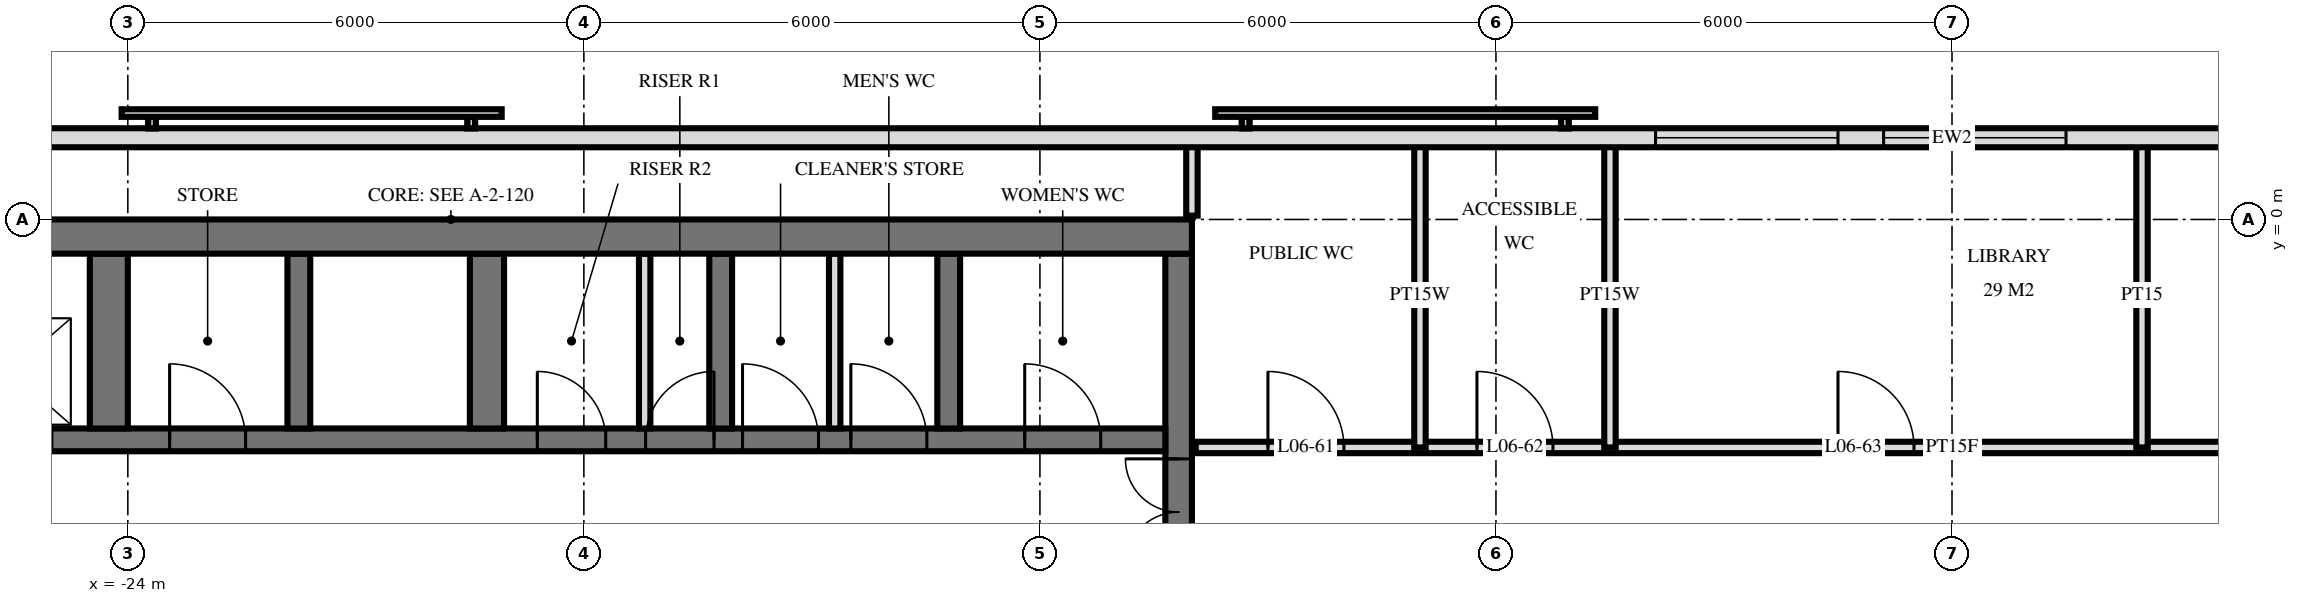
"""IFC4 building model, lengths in metres.
Left out: names, types, materials, properties, quantities, classifications, styles, units other than length and angle.
Written with IfcOpenShell. Run it as: python <this file> out.ifc"""

import sys

from ifc_helpers import new_model, si_unit, direction, frame, frame_2d, origin, place, context, subcontext, project, spatial, rectangle, extrude, element, fill, save


model = new_model("IFC4")
c1 = context("Model", 3, precision=1e-05, world=origin(), true_north=direction((0.0, 1.0)))
c2 = subcontext(c1, "Body", "Model", "MODEL_VIEW")
j1 = project(units=[si_unit("LENGTHUNIT", "METRE"), si_unit("PLANEANGLEUNIT", "RADIAN")], contexts=[c1])
p1 = place(None, origin())
s1 = spatial("IfcSite", under=j1, at=p1, CompositionType="ELEMENT")
p2 = place(p1, origin())
s2 = spatial("IfcBuilding", under=s1, at=p2, CompositionType="ELEMENT")
p3 = place(p2, frame((0.0, 0.0, 31.2)))
s3 = spatial("IfcBuildingStorey", under=s2, at=p3, CompositionType="ELEMENT", Elevation=31.2)
p4 = place(p3, frame((-29.5, -0.225, 0.0), z_axis=(0.0, 0.0, 1.0), x_axis=(1.0, 0.0, 0.0)))
e1 = element("IfcWall", 1, at=p4, inside=s3, PredefinedType="SHEAR", context=c2, shape_type="SweptSolid", body=[
    extrude(rectangle(XDim=19.5, YDim=0.45, at=frame_2d((9.75, 0.0))), origin(), (0.0, 0.0, 1.0), 3.6),
])
p5 = place(p3, frame((-10.175, -14.55, 0.0), z_axis=(0.0, 0.0, 1.0), x_axis=(0.0, 1.0, 0.0)))
e2 = element("IfcWall", 2, at=p5, inside=s3, PredefinedType="SHEAR", context=c2, shape_type="SweptSolid", body=[
    extrude(rectangle(XDim=14.1, YDim=0.35, at=frame_2d((7.05, 0.0))), origin(), (0.0, 0.0, 1.0), 3.6),
])
p6 = place(p5, frame((8.4, 0.0, 0.0)))
e3 = element("IfcOpeningElement", 3, at=p6, cuts=e2, PredefinedType="OPENING", context=c2, shape_type="SweptSolid", body=[
    extrude(rectangle(XDim=1.4, YDim=2.4, at=frame_2d((0.7, 1.2))), frame((0.0, 0.185, 0.0), z_axis=(0.0, -1.0, 0.0), x_axis=(1.0, 0.0, 0.0)), (0.0, 0.0, 1.0), 0.37),
])
p7 = place(p5, frame((10.0, 0.0, 0.0)))
e4 = element("IfcOpeningElement", 4, at=p7, cuts=e2, PredefinedType="OPENING", context=c2, shape_type="SweptSolid", body=[
    extrude(rectangle(XDim=1.4, YDim=2.4, at=frame_2d((0.7, 1.2))), frame((0.0, 0.185, 0.0), z_axis=(0.0, -1.0, 0.0), x_axis=(1.0, 0.0, 0.0)), (0.0, 0.0, 1.0), 0.37),
])
p8 = place(p5, frame((4.0, 0.0, 0.0)))
e5 = element("IfcOpeningElement", 5, at=p8, cuts=e2, PredefinedType="OPENING", context=c2, shape_type="SweptSolid", body=[
    extrude(rectangle(XDim=1.2, YDim=2.1, at=frame_2d((0.6, 1.05))), frame((0.0, 0.185, 0.0), z_axis=(0.0, -1.0, 0.0), x_axis=(1.0, 0.0, 0.0)), (0.0, 0.0, 1.0), 0.37),
])
p9 = place(p3, frame((-29.05, -2.9, 0.0), z_axis=(0.0, 0.0, 1.0), x_axis=(1.0, 0.0, 0.0)))
e6 = element("IfcWall", 6, at=p9, inside=s3, PredefinedType="SHEAR", context=c2, shape_type="SweptSolid", body=[
    extrude(rectangle(XDim=18.7, YDim=0.3, at=frame_2d((9.35, 0.0))), origin(), (0.0, 0.0, 1.0), 3.6),
])
p10 = place(p9, frame((2.95, 0.0, 0.0)))
e7 = element("IfcOpeningElement", 7, at=p10, cuts=e6, PredefinedType="OPENING", context=c2, shape_type="SweptSolid", body=[
    extrude(rectangle(XDim=1.1, YDim=2.1, at=frame_2d((0.55, 1.05))), frame((0.0, 0.16, 0.0), z_axis=(0.0, -1.0, 0.0), x_axis=(1.0, 0.0, 0.0)), (0.0, 0.0, 1.0), 0.32),
])
p11 = place(p9, frame((0.55, 0.0, 0.0)))
e8 = element("IfcOpeningElement", 8, at=p11, cuts=e6, PredefinedType="OPENING", context=c2, shape_type="SweptSolid", body=[
    extrude(rectangle(XDim=1.1, YDim=2.1, at=frame_2d((0.55, 1.05))), frame((0.0, 0.16, 0.0), z_axis=(0.0, -1.0, 0.0), x_axis=(1.0, 0.0, 0.0)), (0.0, 0.0, 1.0), 0.32),
])
p12 = place(p9, frame((11.863, 0.0, 0.0)))
e9 = element("IfcOpeningElement", 9, at=p12, cuts=e6, PredefinedType="OPENING", context=c2, shape_type="SweptSolid", body=[
    extrude(rectangle(XDim=0.9, YDim=2.1, at=frame_2d((0.45, 1.05))), frame((0.0, 0.16, 0.0), z_axis=(0.0, -1.0, 0.0), x_axis=(1.0, 0.0, 0.0)), (0.0, 0.0, 1.0), 0.32),
])
p13 = place(p9, frame((10.438, 0.0, 0.0)))
e10 = element("IfcOpeningElement", 10, at=p13, cuts=e6, PredefinedType="OPENING", context=c2, shape_type="SweptSolid", body=[
    extrude(rectangle(XDim=0.9, YDim=2.1, at=frame_2d((0.45, 1.05))), frame((0.0, 0.16, 0.0), z_axis=(0.0, -1.0, 0.0), x_axis=(1.0, 0.0, 0.0)), (0.0, 0.0, 1.0), 0.32),
])
p14 = place(p9, frame((16.85, 0.0, 0.0)))
e11 = element("IfcOpeningElement", 11, at=p14, cuts=e6, PredefinedType="OPENING", context=c2, shape_type="SweptSolid", body=[
    extrude(rectangle(XDim=1.0, YDim=2.1, at=frame_2d((0.5, 1.05))), frame((0.0, 0.16, 0.0), z_axis=(0.0, -1.0, 0.0), x_axis=(1.0, 0.0, 0.0)), (0.0, 0.0, 1.0), 0.32),
])
p15 = place(p9, frame((14.562, 0.0, 0.0)))
e12 = element("IfcOpeningElement", 12, at=p15, cuts=e6, PredefinedType="OPENING", context=c2, shape_type="SweptSolid", body=[
    extrude(rectangle(XDim=1.0, YDim=2.1, at=frame_2d((0.5, 1.05))), frame((0.0, 0.16, 0.0), z_axis=(0.0, -1.0, 0.0), x_axis=(1.0, 0.0, 0.0)), (0.0, 0.0, 1.0), 0.32),
])
p16 = place(p9, frame((13.137, 0.0, 0.0)))
e13 = element("IfcOpeningElement", 13, at=p16, cuts=e6, PredefinedType="OPENING", context=c2, shape_type="SweptSolid", body=[
    extrude(rectangle(XDim=1.0, YDim=2.1, at=frame_2d((0.5, 1.05))), frame((0.0, 0.16, 0.0), z_axis=(0.0, -1.0, 0.0), x_axis=(1.0, 0.0, 0.0)), (0.0, 0.0, 1.0), 0.32),
])
p17 = place(p9, frame((5.6, 0.0, 0.0)))
e14 = element("IfcOpeningElement", 14, at=p17, cuts=e6, PredefinedType="OPENING", context=c2, shape_type="SweptSolid", body=[
    extrude(rectangle(XDim=1.0, YDim=2.1, at=frame_2d((0.5, 1.05))), frame((0.0, 0.16, 0.0), z_axis=(0.0, -1.0, 0.0), x_axis=(1.0, 0.0, 0.0)), (0.0, 0.0, 1.0), 0.32),
])
for number, where, z_axis, x_axis in (
    (15, (-13.2, -2.75, 0.0), (0.0, 0.0, 1.0), (0.0, 1.0, 0.0)),
    (16, (-16.2, -2.75, 0.0), (0.0, 0.0, 1.0), (0.0, 1.0, 0.0)),
):
    element("IfcWall", number, at=place(p3, frame(where, z_axis=z_axis, x_axis=x_axis)), inside=s3, PredefinedType="SHEAR", context=c2, shape_type="SweptSolid", body=[
        extrude(rectangle(XDim=2.3, YDim=0.3, at=frame_2d((1.15, 0.0))), origin(), (0.0, 0.0, 1.0), 3.6),
    ])
p18 = place(p3, frame((-19.275, -2.75, 0.0), z_axis=(0.0, 0.0, 1.0), x_axis=(0.0, 1.0, 0.0)))
e17 = element("IfcWall", 17, at=p18, inside=s3, PredefinedType="SHEAR", context=c2, shape_type="SweptSolid", body=[
    extrude(rectangle(XDim=2.3, YDim=0.45, at=frame_2d((1.15, 0.0))), origin(), (0.0, 0.0, 1.0), 3.6),
])
p19 = place(p3, frame((-21.75, -2.75, 0.0), z_axis=(0.0, 0.0, 1.0), x_axis=(0.0, 1.0, 0.0)))
e18 = element("IfcWall", 18, at=p19, inside=s3, PredefinedType="SHEAR", context=c2, shape_type="SweptSolid", body=[
    extrude(rectangle(XDim=2.3, YDim=0.3, at=frame_2d((1.15, 0.0))), origin(), (0.0, 0.0, 1.0), 3.6),
])
p20 = place(p3, frame((-24.25, -2.75, 0.0), z_axis=(0.0, 0.0, 1.0), x_axis=(0.0, 1.0, 0.0)))
e19 = element("IfcWall", 19, at=p20, inside=s3, PredefinedType="SHEAR", context=c2, shape_type="SweptSolid", body=[
    extrude(rectangle(XDim=2.3, YDim=0.5, at=frame_2d((1.15, 0.0))), origin(), (0.0, 0.0, 1.0), 3.6),
])
p21 = place(p3, frame((28.775, 1.075, 0.0), z_axis=(0.0, 0.0, 1.0), x_axis=(-1.0, 0.0, 0.0)))
e20 = element("IfcWall", 20, at=p21, inside=s3, PredefinedType="SOLIDWALL", context=c2, shape_type="SweptSolid", body=[
    extrude(rectangle(XDim=57.551, YDim=0.25, at=frame_2d((28.775, 0.0))), origin(), (0.0, 0.0, 1.0), 3.32),
])
p22 = place(p21, frame((21.275, 0.0, 0.3)))
e21 = element("IfcOpeningElement", 21, at=p22, cuts=e20, PredefinedType="OPENING", context=c2, shape_type="SweptSolid", body=[
    extrude(rectangle(XDim=2.4, YDim=2.1, at=frame_2d((1.2, 1.05))), frame((0.0, 0.135, 0.0), z_axis=(0.0, -1.0, 0.0), x_axis=(1.0, 0.0, 0.0)), (0.0, 0.0, 1.0), 0.27),
])
p23 = place(p21, frame((27.275, 0.0, 0.3)))
e22 = element("IfcOpeningElement", 22, at=p23, cuts=e20, PredefinedType="OPENING", context=c2, shape_type="SweptSolid", body=[
    extrude(rectangle(XDim=2.4, YDim=2.1, at=frame_2d((1.2, 1.05))), frame((0.0, 0.135, 0.0), z_axis=(0.0, -1.0, 0.0), x_axis=(1.0, 0.0, 0.0)), (0.0, 0.0, 1.0), 0.27),
])
p24 = place(p21, frame((30.275, 0.0, 0.3)))
e23 = element("IfcOpeningElement", 23, at=p24, cuts=e20, PredefinedType="OPENING", context=c2, shape_type="SweptSolid", body=[
    extrude(rectangle(XDim=2.4, YDim=2.1, at=frame_2d((1.2, 1.05))), frame((0.0, 0.135, 0.0), z_axis=(0.0, -1.0, 0.0), x_axis=(1.0, 0.0, 0.0)), (0.0, 0.0, 1.0), 0.27),
])
for number, where, z_axis, x_axis in (
    (24, (-17.2, -2.75, 0.0), (0.0, 0.0, 1.0), (0.0, 1.0, 0.0)),
    (25, (-14.7, -2.75, 0.0), (0.0, 0.0, 1.0), (0.0, 1.0, 0.0)),
):
    element("IfcWall", number, at=place(p3, frame(where, z_axis=z_axis, x_axis=x_axis)), inside=s3, PredefinedType="PARTITIONING", context=c2, shape_type="SweptSolid", body=[
        extrude(rectangle(XDim=2.3, YDim=0.15, at=frame_2d((1.15, 0.0))), origin(), (0.0, 0.0, 1.0), 3.3),
    ])
p25 = place(p3, frame((2.5, -3.0, 0.0), z_axis=(0.0, 0.0, 1.0), x_axis=(0.0, 1.0, 0.0)))
e26 = element("IfcWall", 26, at=p25, inside=s3, PredefinedType="PARTITIONING", context=c2, shape_type="SweptSolid", body=[
    extrude(rectangle(XDim=4.02, YDim=0.15, at=frame_2d((2.01, 0.0))), origin(), (0.0, 0.0, 1.0), 3.32),
])
for number, where, z_axis, x_axis in (
    (27, (-4.5, -3.0, 0.0), (0.0, 0.0, 1.0), (0.0, 1.0, 0.0)),
    (28, (-7.0, -3.0, 0.0), (0.0, 0.0, 1.0), (0.0, 1.0, 0.0)),
):
    element("IfcWall", number, at=place(p3, frame(where, z_axis=z_axis, x_axis=x_axis)), inside=s3, PredefinedType="PLUMBINGWALL", context=c2, shape_type="SweptSolid", body=[
        extrude(rectangle(XDim=4.02, YDim=0.15, at=frame_2d((2.01, 0.0))), origin(), (0.0, 0.0, 1.0), 3.32),
    ])
p26 = place(p3, frame((-10.0, 0.05, 0.0), z_axis=(0.0, 0.0, 1.0), x_axis=(0.0, 1.0, 0.0)))
e29 = element("IfcWall", 29, at=p26, inside=s3, PredefinedType="PLUMBINGWALL", context=c2, shape_type="SweptSolid", body=[
    extrude(rectangle(XDim=0.97, YDim=0.15, at=frame_2d((0.485, 0.0))), origin(), (0.0, 0.0, 1.0), 3.32),
])
p27 = place(p3, frame((-9.95, -3.0, 0.0), z_axis=(0.0, 0.0, 1.0), x_axis=(1.0, 0.0, 0.0)))
e30 = element("IfcWall", 30, at=p27, inside=s3, PredefinedType="PARTITIONING", context=c2, shape_type="SweptSolid", body=[
    extrude(rectangle(XDim=19.9, YDim=0.15, at=frame_2d((9.95, 0.0))), origin(), (0.0, 0.0, 1.0), 3.32),
])
p28 = place(p27, frame((0.95, 0.0, 0.0)))
e31 = element("IfcOpeningElement", 31, at=p28, cuts=e30, PredefinedType="OPENING", context=c2, shape_type="SweptSolid", body=[
    extrude(rectangle(XDim=1.0, YDim=2.1, at=frame_2d((0.5, 1.05))), frame((0.0, 0.085, 0.0), z_axis=(0.0, -1.0, 0.0), x_axis=(1.0, 0.0, 0.0)), (0.0, 0.0, 1.0), 0.17),
])
p29 = place(p27, frame((3.7, 0.0, 0.0)))
e32 = element("IfcOpeningElement", 32, at=p29, cuts=e30, PredefinedType="OPENING", context=c2, shape_type="SweptSolid", body=[
    extrude(rectangle(XDim=1.0, YDim=2.1, at=frame_2d((0.5, 1.05))), frame((0.0, 0.085, 0.0), z_axis=(0.0, -1.0, 0.0), x_axis=(1.0, 0.0, 0.0)), (0.0, 0.0, 1.0), 0.17),
])
p30 = place(p27, frame((8.45, 0.0, 0.0)))
e33 = element("IfcOpeningElement", 33, at=p30, cuts=e30, PredefinedType="OPENING", context=c2, shape_type="SweptSolid", body=[
    extrude(rectangle(XDim=1.0, YDim=2.1, at=frame_2d((0.5, 1.05))), frame((0.0, 0.085, 0.0), z_axis=(0.0, -1.0, 0.0), x_axis=(1.0, 0.0, 0.0)), (0.0, 0.0, 1.0), 0.17),
])
p31 = place(p27, frame((15.7, 0.0, 0.0)))
e34 = element("IfcOpeningElement", 34, at=p31, cuts=e30, PredefinedType="OPENING", context=c2, shape_type="SweptSolid", body=[
    extrude(rectangle(XDim=1.0, YDim=2.1, at=frame_2d((0.5, 1.05))), frame((0.0, 0.085, 0.0), z_axis=(0.0, -1.0, 0.0), x_axis=(1.0, 0.0, 0.0)), (0.0, 0.0, 1.0), 0.17),
])
p32 = place(p23, origin())
e35 = element("IfcWindow", 35, at=p32, inside=s3, PartitioningType="SINGLE_PANEL", PredefinedType="WINDOW", context=c2, shape_type="SweptSolid", body=[
    extrude(rectangle(XDim=2.4, YDim=2.1, at=frame_2d((1.2, 1.05))), frame((0.0, 0.03, 0.0), z_axis=(0.0, -1.0, 0.0), x_axis=(1.0, 0.0, 0.0)), (0.0, 0.0, 1.0), 0.06),
])
fill(e22, e35)
p33 = place(p24, origin())
e36 = element("IfcWindow", 36, at=p33, inside=s3, PartitioningType="SINGLE_PANEL", PredefinedType="WINDOW", context=c2, shape_type="SweptSolid", body=[
    extrude(rectangle(XDim=2.4, YDim=2.1, at=frame_2d((1.2, 1.05))), frame((0.0, 0.03, 0.0), z_axis=(0.0, -1.0, 0.0), x_axis=(1.0, 0.0, 0.0)), (0.0, 0.0, 1.0), 0.06),
])
fill(e23, e36)
p34 = place(p7, origin())
e37 = element("IfcDoor", 37, at=p34, inside=s3, OperationType="DOUBLE_DOOR_SINGLE_SWING", PredefinedType="DOOR", context=c2, shape_type="SweptSolid", body=[
    extrude(rectangle(XDim=1.4, YDim=2.4, at=frame_2d((0.7, 1.2))), frame((0.0, 0.025, 0.0), z_axis=(0.0, -1.0, 0.0), x_axis=(1.0, 0.0, 0.0)), (0.0, 0.0, 1.0), 0.05),
])
fill(e4, e37)
p35 = place(p12, origin())
e38 = element("IfcDoor", 38, at=p35, inside=s3, OperationType="SINGLE_SWING_LEFT", PredefinedType="DOOR", context=c2, shape_type="SweptSolid", body=[
    extrude(rectangle(XDim=0.9, YDim=2.1, at=frame_2d((0.45, 1.05))), frame((0.0, 0.025, 0.0), z_axis=(0.0, -1.0, 0.0), x_axis=(1.0, 0.0, 0.0)), (0.0, 0.0, 1.0), 0.05),
])
fill(e9, e38)
p36 = place(p13, origin())
e39 = element("IfcDoor", 39, at=p36, inside=s3, OperationType="SINGLE_SWING_RIGHT", PredefinedType="DOOR", context=c2, shape_type="SweptSolid", body=[
    extrude(rectangle(XDim=0.9, YDim=2.1, at=frame_2d((0.45, 1.05))), frame((0.0, 0.025, 0.0), z_axis=(0.0, -1.0, 0.0), x_axis=(1.0, 0.0, 0.0)), (0.0, 0.0, 1.0), 0.05),
])
fill(e10, e39)
p37 = place(p14, origin())
e40 = element("IfcDoor", 40, at=p37, inside=s3, OperationType="SINGLE_SWING_RIGHT", PredefinedType="DOOR", context=c2, shape_type="SweptSolid", body=[
    extrude(rectangle(XDim=1.0, YDim=2.1, at=frame_2d((0.5, 1.05))), frame((0.0, 0.025, 0.0), z_axis=(0.0, -1.0, 0.0), x_axis=(1.0, 0.0, 0.0)), (0.0, 0.0, 1.0), 0.05),
])
fill(e11, e40)
p38 = place(p15, origin())
e41 = element("IfcDoor", 41, at=p38, inside=s3, OperationType="SINGLE_SWING_RIGHT", PredefinedType="DOOR", context=c2, shape_type="SweptSolid", body=[
    extrude(rectangle(XDim=1.0, YDim=2.1, at=frame_2d((0.5, 1.05))), frame((0.0, 0.025, 0.0), z_axis=(0.0, -1.0, 0.0), x_axis=(1.0, 0.0, 0.0)), (0.0, 0.0, 1.0), 0.05),
])
fill(e12, e41)
p39 = place(p16, origin())
e42 = element("IfcDoor", 42, at=p39, inside=s3, OperationType="SINGLE_SWING_RIGHT", PredefinedType="DOOR", context=c2, shape_type="SweptSolid", body=[
    extrude(rectangle(XDim=1.0, YDim=2.1, at=frame_2d((0.5, 1.05))), frame((0.0, 0.025, 0.0), z_axis=(0.0, -1.0, 0.0), x_axis=(1.0, 0.0, 0.0)), (0.0, 0.0, 1.0), 0.05),
])
fill(e13, e42)
p40 = place(p17, origin())
e43 = element("IfcDoor", 43, at=p40, inside=s3, OperationType="SINGLE_SWING_RIGHT", PredefinedType="DOOR", context=c2, shape_type="SweptSolid", body=[
    extrude(rectangle(XDim=1.0, YDim=2.1, at=frame_2d((0.5, 1.05))), frame((0.0, 0.025, 0.0), z_axis=(0.0, -1.0, 0.0), x_axis=(1.0, 0.0, 0.0)), (0.0, 0.0, 1.0), 0.05),
])
fill(e14, e43)
p41 = place(p28, origin())
e44 = element("IfcDoor", 44, at=p41, inside=s3, OperationType="SINGLE_SWING_RIGHT", PredefinedType="DOOR", context=c2, shape_type="SweptSolid", body=[
    extrude(rectangle(XDim=1.0, YDim=2.1, at=frame_2d((0.5, 1.05))), frame((0.0, 0.025, 0.0), z_axis=(0.0, -1.0, 0.0), x_axis=(1.0, 0.0, 0.0)), (0.0, 0.0, 1.0), 0.05),
])
fill(e31, e44)
p42 = place(p29, origin())
e45 = element("IfcDoor", 45, at=p42, inside=s3, OperationType="SINGLE_SWING_RIGHT", PredefinedType="DOOR", context=c2, shape_type="SweptSolid", body=[
    extrude(rectangle(XDim=1.0, YDim=2.1, at=frame_2d((0.5, 1.05))), frame((0.0, 0.025, 0.0), z_axis=(0.0, -1.0, 0.0), x_axis=(1.0, 0.0, 0.0)), (0.0, 0.0, 1.0), 0.05),
])
fill(e32, e45)
p43 = place(p30, origin())
e46 = element("IfcDoor", 46, at=p43, inside=s3, OperationType="SINGLE_SWING_RIGHT", PredefinedType="DOOR", context=c2, shape_type="SweptSolid", body=[
    extrude(rectangle(XDim=1.0, YDim=2.1, at=frame_2d((0.5, 1.05))), frame((0.0, 0.025, 0.0), z_axis=(0.0, -1.0, 0.0), x_axis=(1.0, 0.0, 0.0)), (0.0, 0.0, 1.0), 0.05),
])
fill(e33, e46)
save(model, sys.argv[1])
